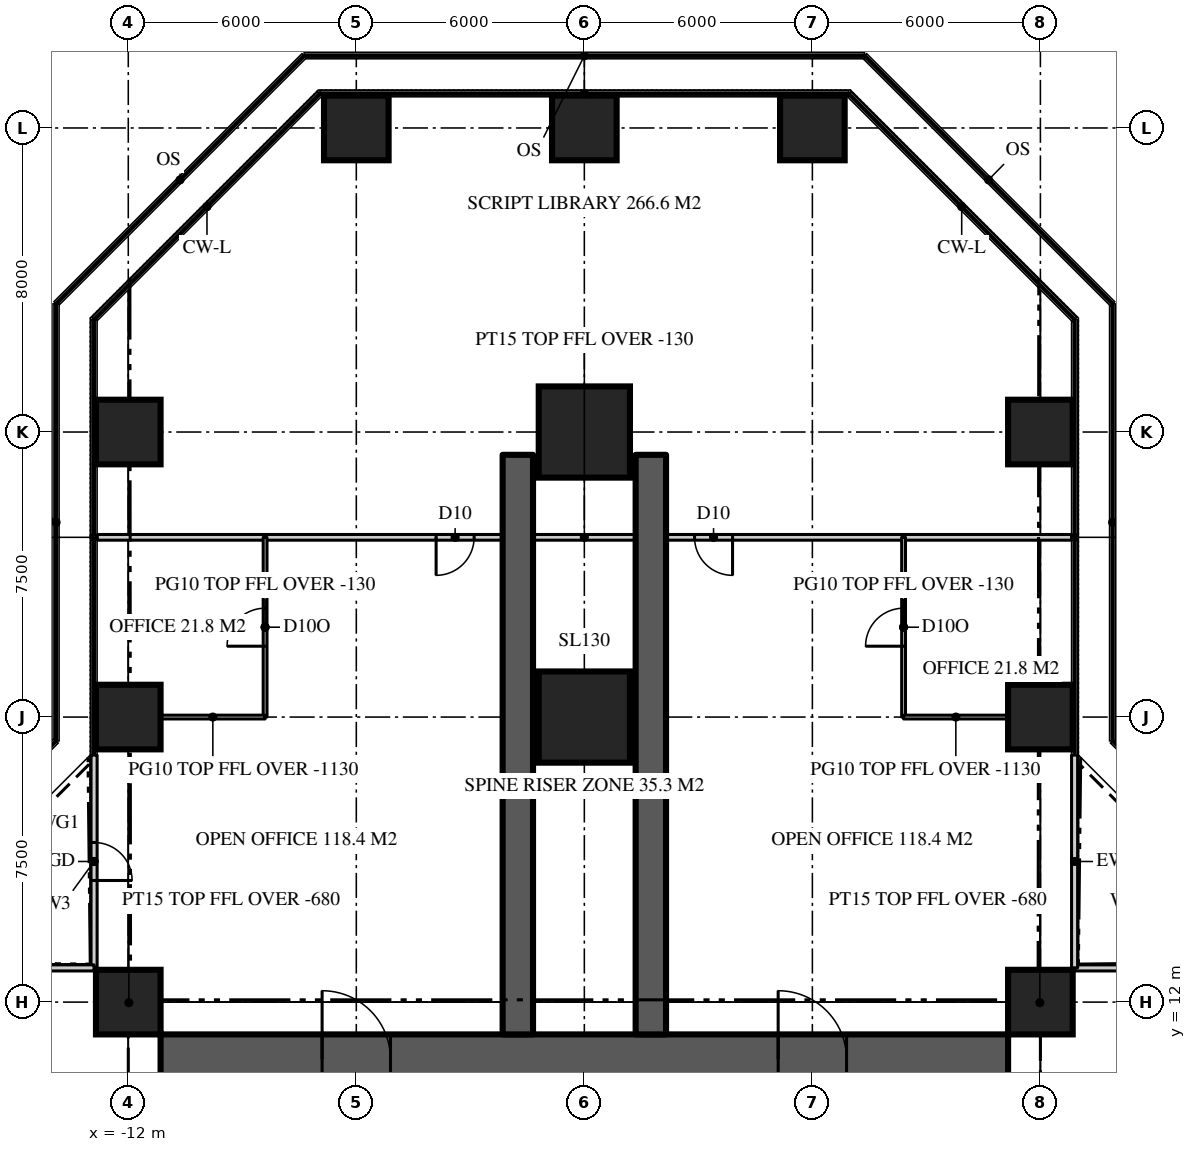
"""IFC4 building model, lengths in metres.
Left out: names, types, materials, properties, quantities, classifications, styles, units other than length and angle.
Written with IfcOpenShell. Run it as: python <this file> out.ifc"""

import sys

from ifc_helpers import new_model, si_unit, direction, frame, frame_2d, origin, origin_2d, place, context, subcontext, project, spatial, rectangle, extrude, element, fill, save


model = new_model("IFC4")
c1 = context("Model", 3, precision=1e-05, world=origin(), true_north=direction((0.0, 1.0)))
c2 = subcontext(c1, "Body", "Model", "MODEL_VIEW")
j1 = project(units=[si_unit("LENGTHUNIT", "METRE"), si_unit("PLANEANGLEUNIT", "RADIAN")], contexts=[c1])
p1 = place(None, origin())
s1 = spatial("IfcSite", under=j1, at=p1, CompositionType="ELEMENT")
p2 = place(p1, origin())
s2 = spatial("IfcBuilding", under=s1, at=p2, CompositionType="ELEMENT")
p3 = place(p2, frame((0.0, 0.0, 78.6)))
s3 = spatial("IfcBuildingStorey", under=s2, at=p3, CompositionType="ELEMENT", Elevation=78.6)
p4 = place(p3, frame((-11.15, 10.5, 0.0), z_axis=(0.0, 0.0, 1.0), x_axis=(1.0, 0.0, 0.0)))
e1 = element("IfcWall", 1, at=p4, inside=s3, PredefinedType="SHEAR", context=c2, shape_type="SweptSolid", body=[
    extrude(rectangle(XDim=22.3, YDim=1.3, at=frame_2d((11.15, 0.0))), origin(), (0.0, 0.0, 1.0), 3.9),
])
p5 = place(p4, frame((4.25, 0.0, 0.0)))
e2 = element("IfcOpeningElement", 2, at=p5, cuts=e1, PredefinedType="OPENING", context=c2, shape_type="SweptSolid", body=[
    extrude(rectangle(XDim=1.8, YDim=2.2, at=frame_2d((0.9, 1.1))), frame((0.0, 0.66, 0.0), z_axis=(0.0, -1.0, 0.0), x_axis=(1.0, 0.0, 0.0)), (0.0, 0.0, 1.0), 1.32),
])
p6 = place(p4, frame((16.25, 0.0, 0.0)))
e3 = element("IfcOpeningElement", 3, at=p6, cuts=e1, PredefinedType="OPENING", context=c2, shape_type="SweptSolid", body=[
    extrude(rectangle(XDim=1.8, YDim=2.2, at=frame_2d((0.9, 1.1))), frame((0.0, 0.66, 0.0), z_axis=(0.0, -1.0, 0.0), x_axis=(1.0, 0.0, 0.0)), (0.0, 0.0, 1.0), 1.32),
])
for number, where, z_axis, x_axis in (
    (4, (1.75, 11.15, 0.0), (0.0, 0.0, 1.0), (0.0, 1.0, 0.0)),
    (5, (-1.75, 11.15, 0.0), (0.0, 0.0, 1.0), (0.0, 1.0, 0.0)),
):
    element("IfcWall", number, at=place(p3, frame(where, z_axis=z_axis, x_axis=x_axis)), inside=s3, PredefinedType="SHEAR", context=c2, shape_type="SweptSolid", body=[
        extrude(rectangle(XDim=15.25, YDim=0.8, at=frame_2d((7.625, 0.0))), origin(), (0.0, 0.0, 1.0), 3.9),
    ])
for number, where, z_axis, x_axis in (
    (6, (-12.0, 12.0, 0.0), (0.0, 0.0, 1.0), (1.0, 0.0, 0.0)),
    (7, (12.0, 12.0, 0.0), (0.0, 0.0, 1.0), (1.0, 0.0, 0.0)),
    (8, (-12.0, 19.5, 0.0), (0.0, 0.0, 1.0), (1.0, 0.0, 0.0)),
):
    element("IfcColumn", number, at=place(p3, frame(where, z_axis=z_axis, x_axis=x_axis)), inside=s3, PredefinedType="COLUMN", context=c2, shape_type="SweptSolid", body=[
        extrude(rectangle(XDim=1.7, YDim=1.7, at=origin_2d()), origin(), (0.0, 0.0, 1.0), 3.9),
    ])
p7 = place(p3, frame((0.0, 19.5, 0.0), z_axis=(0.0, 0.0, 1.0), x_axis=(1.0, 0.0, 0.0)))
e9 = element("IfcColumn", 9, at=p7, inside=s3, PredefinedType="COLUMN", context=c2, shape_type="SweptSolid", body=[
    extrude(rectangle(XDim=2.4, YDim=2.4, at=origin_2d()), origin(), (0.0, 0.0, 1.0), 3.9),
])
for number, where, z_axis, x_axis in (
    (10, (12.0, 19.5, 0.0), (0.0, 0.0, 1.0), (1.0, 0.0, 0.0)),
    (11, (-12.0, 27.0, 0.0), (0.0, 0.0, 1.0), (1.0, 0.0, 0.0)),
):
    element("IfcColumn", number, at=place(p3, frame(where, z_axis=z_axis, x_axis=x_axis)), inside=s3, PredefinedType="COLUMN", context=c2, shape_type="SweptSolid", body=[
        extrude(rectangle(XDim=1.7, YDim=1.7, at=origin_2d()), origin(), (0.0, 0.0, 1.0), 3.9),
    ])
p8 = place(p3, frame((0.0, 27.0, 0.0), z_axis=(0.0, 0.0, 1.0), x_axis=(1.0, 0.0, 0.0)))
e12 = element("IfcColumn", 12, at=p8, inside=s3, PredefinedType="COLUMN", context=c2, shape_type="SweptSolid", body=[
    extrude(rectangle(XDim=2.4, YDim=2.4, at=origin_2d()), origin(), (0.0, 0.0, 1.0), 3.9),
])
for number, where, z_axis, x_axis in (
    (13, (12.0, 27.0, 0.0), (0.0, 0.0, 1.0), (1.0, 0.0, 0.0)),
    (14, (-6.0, 35.0, 0.0), (0.0, 0.0, 1.0), (1.0, 0.0, 0.0)),
    (15, (0.0, 35.0, 0.0), (0.0, 0.0, 1.0), (1.0, 0.0, 0.0)),
    (16, (6.0, 35.0, 0.0), (0.0, 0.0, 1.0), (1.0, 0.0, 0.0)),
):
    element("IfcColumn", number, at=place(p3, frame(where, z_axis=z_axis, x_axis=x_axis)), inside=s3, PredefinedType="COLUMN", context=c2, shape_type="SweptSolid", body=[
        extrude(rectangle(XDim=1.7, YDim=1.7, at=origin_2d()), origin(), (0.0, 0.0, 1.0), 3.9),
    ])
p9 = place(p3, frame((18.5, 12.9, 0.0), z_axis=(0.0, 0.0, 1.0), x_axis=(-1.0, 0.0, 0.0)))
e17 = element("IfcWall", 17, at=p9, inside=s3, PredefinedType="SOLIDWALL", context=c2, shape_type="SweptSolid", body=[
    extrude(rectangle(XDim=5.6, YDim=0.16, at=frame_2d((2.8, 0.0))), origin(), (0.0, 0.0, 1.0), 3.77),
])
p10 = place(p9, frame((2.3, 0.0, 0.0)))
e18 = element("IfcOpeningElement", 18, at=p10, cuts=e17, PredefinedType="OPENING", context=c2, shape_type="SweptSolid", body=[
    extrude(rectangle(XDim=1.0, YDim=2.2, at=frame_2d((0.5, 1.1))), frame((0.0, 0.09, 0.0), z_axis=(0.0, -1.0, 0.0), x_axis=(1.0, 0.0, 0.0)), (0.0, 0.0, 1.0), 0.18),
])
p11 = place(p3, frame((12.9, 12.9, 0.0), z_axis=(0.0, 0.0, 1.0), x_axis=(0.0, 1.0, 0.0)))
e19 = element("IfcWall", 19, at=p11, inside=s3, PredefinedType="SOLIDWALL", context=c2, shape_type="SweptSolid", body=[
    extrude(rectangle(XDim=5.6, YDim=0.16, at=frame_2d((2.8, 0.0))), origin(), (0.0, 0.0, 1.0), 3.77),
])
p12 = place(p3, frame((-12.9, 18.5, 0.0), z_axis=(0.0, 0.0, 1.0), x_axis=(0.0, -1.0, 0.0)))
e20 = element("IfcWall", 20, at=p12, inside=s3, PredefinedType="SOLIDWALL", context=c2, shape_type="SweptSolid", body=[
    extrude(rectangle(XDim=5.6, YDim=0.16, at=frame_2d((2.8, 0.0))), origin(), (0.0, 0.0, 1.0), 3.77),
])
p13 = place(p12, frame((2.3, 0.0, 0.0)))
e21 = element("IfcOpeningElement", 21, at=p13, cuts=e20, PredefinedType="OPENING", context=c2, shape_type="SweptSolid", body=[
    extrude(rectangle(XDim=1.0, YDim=2.2, at=frame_2d((0.5, 1.1))), frame((0.0, 0.09, 0.0), z_axis=(0.0, -1.0, 0.0), x_axis=(1.0, 0.0, 0.0)), (0.0, 0.0, 1.0), 0.18),
])
p14 = place(p3, frame((-12.9, 12.9, 0.0), z_axis=(0.0, 0.0, 1.0), x_axis=(-1.0, 0.0, 0.0)))
e22 = element("IfcWall", 22, at=p14, inside=s3, PredefinedType="SOLIDWALL", context=c2, shape_type="SweptSolid", body=[
    extrude(rectangle(XDim=5.6, YDim=0.16, at=frame_2d((2.8, 0.0))), origin(), (0.0, 0.0, 1.0), 3.77),
])
p15 = place(p3, frame((12.82, 24.229, 0.0), z_axis=(0.0, 0.0, 1.0), x_axis=(-1.0, 0.0, 0.0)))
e23 = element("IfcWall", 23, at=p15, inside=s3, PredefinedType="PARTITIONING", context=c2, shape_type="SweptSolid", body=[
    extrude(rectangle(XDim=25.64, YDim=0.15, at=frame_2d((12.82, 0.0))), origin(), (0.0, 0.0, 1.0), 3.77),
])
p16 = place(p15, frame((15.72, 0.0, 0.0)))
e24 = element("IfcOpeningElement", 24, at=p16, cuts=e23, PredefinedType="OPENING", context=c2, shape_type="SweptSolid", body=[
    extrude(rectangle(XDim=1.0, YDim=2.2, at=frame_2d((0.5, 1.1))), frame((0.0, 0.085, 0.0), z_axis=(0.0, -1.0, 0.0), x_axis=(1.0, 0.0, 0.0)), (0.0, 0.0, 1.0), 0.17),
])
p17 = place(p15, frame((8.92, 0.0, 0.0)))
e25 = element("IfcOpeningElement", 25, at=p17, cuts=e23, PredefinedType="OPENING", context=c2, shape_type="SweptSolid", body=[
    extrude(rectangle(XDim=1.0, YDim=2.2, at=frame_2d((0.5, 1.1))), frame((0.0, 0.085, 0.0), z_axis=(0.0, -1.0, 0.0), x_axis=(1.0, 0.0, 0.0)), (0.0, 0.0, 1.0), 0.17),
])
p18 = place(p3, frame((-8.4, 19.5, 0.0), z_axis=(0.0, 0.0, 1.0), x_axis=(0.0, 1.0, 0.0)))
e26 = element("IfcWall", 26, at=p18, inside=s3, PredefinedType="PARTITIONING", context=c2, shape_type="SweptSolid", body=[
    extrude(rectangle(XDim=4.729, YDim=0.1, at=frame_2d((2.365, 0.0))), origin(), (0.0, 0.0, 1.0), 3.77),
])
p19 = place(p18, frame((1.865, 0.0, 0.0)))
e27 = element("IfcOpeningElement", 27, at=p19, cuts=e26, PredefinedType="OPENING", context=c2, shape_type="SweptSolid", body=[
    extrude(rectangle(XDim=1.0, YDim=2.2, at=frame_2d((0.5, 1.1))), frame((0.0, 0.06, 0.0), z_axis=(0.0, -1.0, 0.0), x_axis=(1.0, 0.0, 0.0)), (0.0, 0.0, 1.0), 0.12),
])
p20 = place(p3, frame((-8.4, 19.5, 0.0), z_axis=(0.0, 0.0, 1.0), x_axis=(-1.0, 0.0, 0.0)))
e28 = element("IfcWall", 28, at=p20, inside=s3, PredefinedType="PARTITIONING", context=c2, shape_type="SweptSolid", body=[
    extrude(rectangle(XDim=2.75, YDim=0.1, at=frame_2d((1.375, 0.0))), origin(), (0.0, 0.0, 1.0), 2.77),
])
p21 = place(p3, frame((8.4, 19.5, 0.0), z_axis=(0.0, 0.0, 1.0), x_axis=(0.0, 1.0, 0.0)))
e29 = element("IfcWall", 29, at=p21, inside=s3, PredefinedType="PARTITIONING", context=c2, shape_type="SweptSolid", body=[
    extrude(rectangle(XDim=4.729, YDim=0.1, at=frame_2d((2.365, 0.0))), origin(), (0.0, 0.0, 1.0), 3.77),
])
p22 = place(p21, frame((1.865, 0.0, 0.0)))
e30 = element("IfcOpeningElement", 30, at=p22, cuts=e29, PredefinedType="OPENING", context=c2, shape_type="SweptSolid", body=[
    extrude(rectangle(XDim=1.0, YDim=2.2, at=frame_2d((0.5, 1.1))), frame((0.0, 0.06, 0.0), z_axis=(0.0, -1.0, 0.0), x_axis=(1.0, 0.0, 0.0)), (0.0, 0.0, 1.0), 0.12),
])
p23 = place(p3, frame((8.4, 19.5, 0.0), z_axis=(0.0, 0.0, 1.0), x_axis=(1.0, 0.0, 0.0)))
e31 = element("IfcWall", 31, at=p23, inside=s3, PredefinedType="PARTITIONING", context=c2, shape_type="SweptSolid", body=[
    extrude(rectangle(XDim=2.75, YDim=0.1, at=frame_2d((1.375, 0.0))), origin(), (0.0, 0.0, 1.0), 2.77),
])
for number, where, z_axis, x_axis in (
    (32, (11.15, 11.15, 0.0), (0.0, 0.0, 1.0), (0.707, 0.707, 0.0)),
    (33, (-11.15, 11.15, 0.0), (0.0, 0.0, 1.0), (-0.707, 0.707, 0.0)),
):
    element("IfcWall", number, at=place(p3, frame(where, z_axis=z_axis, x_axis=x_axis)), inside=s3, PredefinedType="PARTITIONING", context=c2, shape_type="SweptSolid", body=[
        extrude(rectangle(XDim=2.362, YDim=0.15, at=frame_2d((1.181, 0.0))), origin(), (0.0, 0.0, 1.0), 3.22),
    ])
p24 = place(p13, origin())
e34 = element("IfcDoor", 34, at=p24, inside=s3, OperationType="SINGLE_SWING_RIGHT", PredefinedType="DOOR", context=c2, shape_type="SweptSolid", body=[
    extrude(rectangle(XDim=1.0, YDim=2.2, at=frame_2d((0.5, 1.1))), frame((0.0, 0.025, 0.0), z_axis=(0.0, -1.0, 0.0), x_axis=(1.0, 0.0, 0.0)), (0.0, 0.0, 1.0), 0.05),
])
fill(e21, e34)
p25 = place(p5, origin())
e35 = element("IfcDoor", 35, at=p25, inside=s3, OperationType="DOUBLE_DOOR_DOUBLE_SWING", PredefinedType="DOOR", context=c2, shape_type="SweptSolid", body=[
    extrude(rectangle(XDim=1.8, YDim=2.2, at=frame_2d((0.9, 1.1))), frame((0.0, 0.025, 0.0), z_axis=(0.0, -1.0, 0.0), x_axis=(1.0, 0.0, 0.0)), (0.0, 0.0, 1.0), 0.05),
])
fill(e2, e35)
p26 = place(p6, origin())
e36 = element("IfcDoor", 36, at=p26, inside=s3, OperationType="DOUBLE_DOOR_DOUBLE_SWING", PredefinedType="DOOR", context=c2, shape_type="SweptSolid", body=[
    extrude(rectangle(XDim=1.8, YDim=2.2, at=frame_2d((0.9, 1.1))), frame((0.0, 0.025, 0.0), z_axis=(0.0, -1.0, 0.0), x_axis=(1.0, 0.0, 0.0)), (0.0, 0.0, 1.0), 0.05),
])
fill(e3, e36)
p27 = place(p16, origin())
e37 = element("IfcDoor", 37, at=p27, inside=s3, OperationType="SINGLE_SWING_RIGHT", PredefinedType="DOOR", context=c2, shape_type="SweptSolid", body=[
    extrude(rectangle(XDim=1.0, YDim=2.2, at=frame_2d((0.5, 1.1))), frame((0.0, 0.025, 0.0), z_axis=(0.0, -1.0, 0.0), x_axis=(1.0, 0.0, 0.0)), (0.0, 0.0, 1.0), 0.05),
])
fill(e24, e37)
p28 = place(p17, origin())
e38 = element("IfcDoor", 38, at=p28, inside=s3, OperationType="SINGLE_SWING_LEFT", PredefinedType="DOOR", context=c2, shape_type="SweptSolid", body=[
    extrude(rectangle(XDim=1.0, YDim=2.2, at=frame_2d((0.5, 1.1))), frame((0.0, 0.025, 0.0), z_axis=(0.0, -1.0, 0.0), x_axis=(1.0, 0.0, 0.0)), (0.0, 0.0, 1.0), 0.05),
])
fill(e25, e38)
p29 = place(p19, origin())
e39 = element("IfcDoor", 39, at=p29, inside=s3, OperationType="SINGLE_SWING_LEFT", PredefinedType="DOOR", context=c2, shape_type="SweptSolid", body=[
    extrude(rectangle(XDim=1.0, YDim=2.2, at=frame_2d((0.5, 1.1))), frame((0.0, 0.025, 0.0), z_axis=(0.0, -1.0, 0.0), x_axis=(1.0, 0.0, 0.0)), (0.0, 0.0, 1.0), 0.05),
])
fill(e27, e39)
p30 = place(p22, origin())
e40 = element("IfcDoor", 40, at=p30, inside=s3, OperationType="SINGLE_SWING_LEFT", PredefinedType="DOOR", context=c2, shape_type="SweptSolid", body=[
    extrude(rectangle(XDim=1.0, YDim=2.2, at=frame_2d((0.5, 1.1))), frame((0.0, 0.025, 0.0), z_axis=(0.0, -1.0, 0.0), x_axis=(1.0, 0.0, 0.0)), (0.0, 0.0, 1.0), 0.05),
])
fill(e30, e40)
save(model, sys.argv[1])
